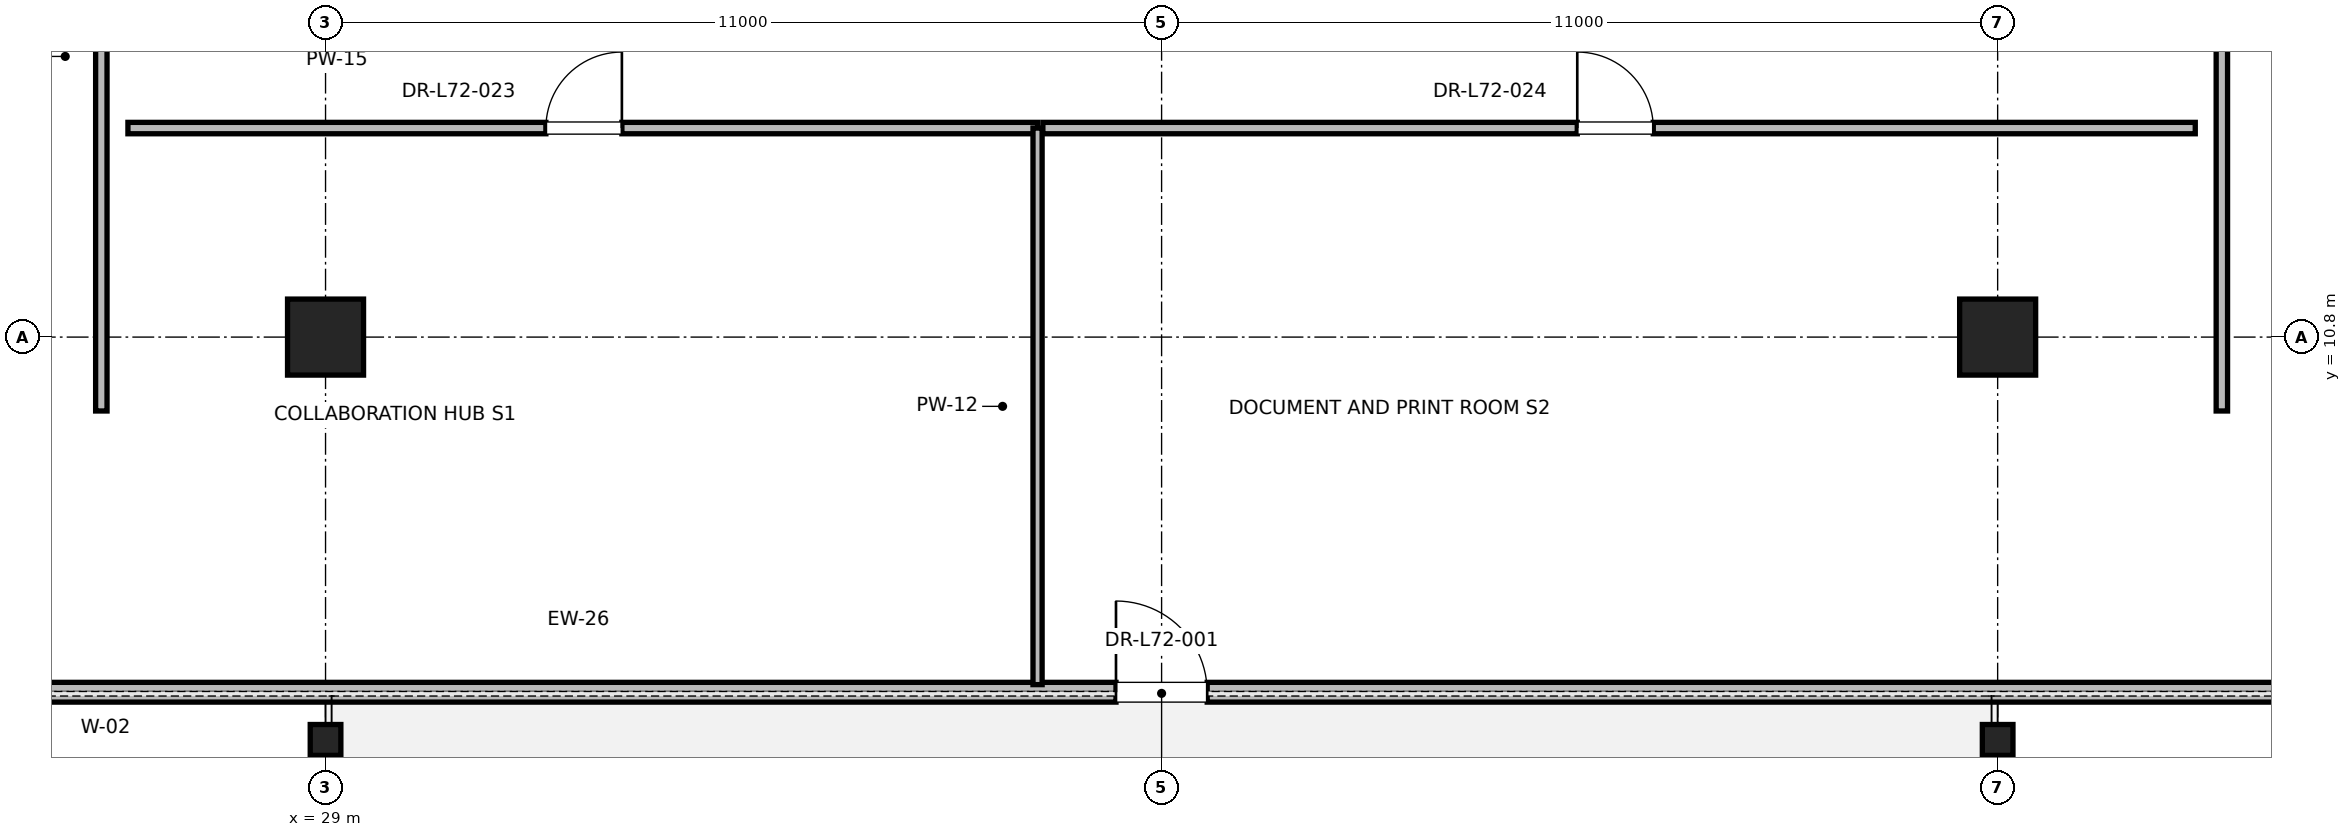
"""IFC4 building model, lengths in metres.
Left out: names, types, materials, properties, quantities, classifications, styles, units other than length and angle.
Written with IfcOpenShell. Run it as: python <this file> out.ifc"""

import sys

from ifc_helpers import new_model, si_unit, direction, frame, frame_2d, origin, origin_2d, place, context, subcontext, project, spatial, rectangle, i_section, extrude, element, fill, save


model = new_model("IFC4")
c1 = context("Model", 3, precision=1e-05, world=origin(), true_north=direction((0.0, 1.0)))
c2 = subcontext(c1, "Body", "Model", "MODEL_VIEW")
j1 = project(units=[si_unit("LENGTHUNIT", "METRE"), si_unit("PLANEANGLEUNIT", "RADIAN")], contexts=[c1])
p1 = place(None, origin())
s1 = spatial("IfcSite", under=j1, at=p1, CompositionType="ELEMENT")
p2 = place(p1, origin())
s2 = spatial("IfcBuilding", under=s1, at=p2, CompositionType="ELEMENT")
p3 = place(p2, frame((0.0, 0.0, 310.8)))
s3 = spatial("IfcBuildingStorey", under=s2, at=p3, CompositionType="ELEMENT", Elevation=310.8)
for number, where, z_axis, x_axis in (
    (1, (29.0, 10.8, 0.0), (0.0, 0.0, 1.0), (1.0, 0.0, 0.0)),
    (2, (51.0, 10.8, 0.0), (0.0, 0.0, 1.0), (1.0, 0.0, 0.0)),
):
    element("IfcColumn", number, at=place(p3, frame(where, z_axis=z_axis, x_axis=x_axis)), inside=s3, PredefinedType="COLUMN", context=c2, shape_type="SweptSolid", body=[
        extrude(rectangle(XDim=1.0, YDim=1.0, at=origin_2d()), origin(), (0.0, 0.0, 1.0), 4.0),
    ])
for number, where, z_axis, x_axis in (
    (3, (29.0, 5.5, 0.0), (0.0, 0.0, 1.0), (1.0, 0.0, 0.0)),
    (4, (51.0, 5.5, 0.0), (0.0, 0.0, 1.0), (1.0, 0.0, 0.0)),
):
    element("IfcColumn", number, at=place(p3, frame(where, z_axis=z_axis, x_axis=x_axis)), inside=s3, PredefinedType="COLUMN", context=c2, shape_type="SweptSolid", body=[
        extrude(i_section(OverallWidth=0.403, OverallDepth=0.406, WebThickness=0.027, FlangeThickness=0.043, FilletRadius=0.015, at=origin_2d()), origin(), (0.0, 0.0, 1.0), 4.0),
    ])
p4 = place(p3, frame((19.456, 6.128, 0.0), z_axis=(0.0, 0.0, 1.0), x_axis=(1.0, 0.0, 0.0)))
e5 = element("IfcWall", 5, at=p4, inside=s3, PredefinedType="PARAPET", context=c2, shape_type="SweptSolid", body=[
    extrude(rectangle(XDim=41.089, YDim=0.26, at=frame_2d((20.544, 0.0))), origin(), (0.0, 0.0, 1.0), 3.196),
])
p5 = place(p4, frame((4.2, 0.0, 0.85)))
e6 = element("IfcOpeningElement", 6, at=p5, cuts=e5, PredefinedType="OPENING", context=c2, shape_type="SweptSolid", body=[
    extrude(rectangle(XDim=1.6, YDim=2.1, at=frame_2d((0.8, 1.05))), frame((0.0, 0.13, 0.0), z_axis=(0.0, -1.0, 0.0), x_axis=(1.0, 0.0, 0.0)), (0.0, 0.0, 1.0), 0.26),
])
p6 = place(p4, frame((19.944, 0.0, 0.0)))
e7 = element("IfcOpeningElement", 7, at=p6, cuts=e5, PredefinedType="OPENING", context=c2, shape_type="SweptSolid", body=[
    extrude(rectangle(XDim=1.2, YDim=2.2, at=frame_2d((0.6, 1.1))), frame((0.0, 0.13, 0.0), z_axis=(0.0, -1.0, 0.0), x_axis=(1.0, 0.0, 0.0)), (0.0, 0.0, 1.0), 0.26),
])
p7 = place(p4, frame((35.289, 0.0, 0.85)))
e8 = element("IfcOpeningElement", 8, at=p7, cuts=e5, PredefinedType="OPENING", context=c2, shape_type="SweptSolid", body=[
    extrude(rectangle(XDim=1.6, YDim=2.1, at=frame_2d((0.8, 1.05))), frame((0.0, 0.13, 0.0), z_axis=(0.0, -1.0, 0.0), x_axis=(1.0, 0.0, 0.0)), (0.0, 0.0, 1.0), 0.26),
])
p8 = place(p3, frame((26.4, 13.55, 0.0), z_axis=(0.0, 0.0, 1.0), x_axis=(1.0, 0.0, 0.0)))
e9 = element("IfcWall", 9, at=p8, inside=s3, PredefinedType="PARTITIONING", context=c2, shape_type="SweptSolid", body=[
    extrude(rectangle(XDim=11.968, YDim=0.15, at=frame_2d((5.984, 0.0))), origin(), (0.0, 0.0, 1.0), 2.85),
])
p9 = place(p8, frame((5.499, 0.0, 0.0)))
e10 = element("IfcOpeningElement", 10, at=p9, cuts=e9, PredefinedType="OPENING", context=c2, shape_type="SweptSolid", body=[
    extrude(rectangle(XDim=1.0, YDim=2.15, at=frame_2d((0.5, 1.075))), frame((0.0, 0.075, 0.0), z_axis=(0.0, -1.0, 0.0), x_axis=(1.0, 0.0, 0.0)), (0.0, 0.0, 1.0), 0.15),
])
p10 = place(p3, frame((38.368, 6.228, 0.0), z_axis=(0.0, 0.0, 1.0), x_axis=(0.0, 1.0, 0.0)))
e11 = element("IfcWall", 11, at=p10, inside=s3, PredefinedType="PARTITIONING", context=c2, shape_type="SweptSolid", body=[
    extrude(rectangle(XDim=7.322, YDim=0.12, at=frame_2d((3.661, 0.0))), origin(), (0.0, 0.0, 1.0), 2.415),
])
p11 = place(p3, frame((38.438, 13.55, 0.0), z_axis=(0.0, 0.0, 1.0), x_axis=(1.0, 0.0, 0.0)))
e12 = element("IfcWall", 12, at=p11, inside=s3, PredefinedType="PARTITIONING", context=c2, shape_type="SweptSolid", body=[
    extrude(rectangle(XDim=15.162, YDim=0.15, at=frame_2d((7.581, 0.0))), origin(), (0.0, 0.0, 1.0), 2.85),
])
p12 = place(p11, frame((7.031, 0.0, 0.0)))
e13 = element("IfcOpeningElement", 13, at=p12, cuts=e12, PredefinedType="OPENING", context=c2, shape_type="SweptSolid", body=[
    extrude(rectangle(XDim=1.0, YDim=2.15, at=frame_2d((0.5, 1.075))), frame((0.0, 0.075, 0.0), z_axis=(0.0, -1.0, 0.0), x_axis=(1.0, 0.0, 0.0)), (0.0, 0.0, 1.0), 0.15),
])
p13 = place(p3, frame((26.05, 9.828, 0.0), z_axis=(0.0, 0.0, 1.0), x_axis=(0.0, 1.0, 0.0)))
e14 = element("IfcWall", 14, at=p13, inside=s3, PredefinedType="PARTITIONING", context=c2, shape_type="SweptSolid", body=[
    extrude(rectangle(XDim=10.957, YDim=0.15, at=frame_2d((5.479, 0.0))), origin(), (0.0, 0.0, 1.0), 2.85),
])
p14 = place(p13, frame((9.33, 0.0, 0.0)))
e15 = element("IfcOpeningElement", 15, at=p14, cuts=e14, PredefinedType="OPENING", context=c2, shape_type="SweptSolid", body=[
    extrude(rectangle(XDim=1.0, YDim=2.15, at=frame_2d((0.5, 1.075))), frame((0.0, 0.075, 0.0), z_axis=(0.0, -1.0, 0.0), x_axis=(1.0, 0.0, 0.0)), (0.0, 0.0, 1.0), 0.15),
])
p15 = place(p3, frame((53.95, 9.828, 0.0), z_axis=(0.0, 0.0, 1.0), x_axis=(0.0, 1.0, 0.0)))
e16 = element("IfcWall", 16, at=p15, inside=s3, PredefinedType="PARTITIONING", context=c2, shape_type="SweptSolid", body=[
    extrude(rectangle(XDim=12.724, YDim=0.15, at=frame_2d((6.362, 0.0))), origin(), (0.0, 0.0, 1.0), 2.85),
])
p16 = place(p15, frame((10.213, 0.0, 0.0)))
e17 = element("IfcOpeningElement", 17, at=p16, cuts=e16, PredefinedType="OPENING", context=c2, shape_type="SweptSolid", body=[
    extrude(rectangle(XDim=1.0, YDim=2.15, at=frame_2d((0.5, 1.075))), frame((0.0, 0.075, 0.0), z_axis=(0.0, -1.0, 0.0), x_axis=(1.0, 0.0, 0.0)), (0.0, 0.0, 1.0), 0.15),
])
p17 = place(p6, origin())
e18 = element("IfcDoor", 18, at=p17, inside=s3, OperationType="SINGLE_SWING_LEFT", PredefinedType="DOOR", context=c2, shape_type="SweptSolid", body=[
    extrude(rectangle(XDim=1.2, YDim=2.2, at=frame_2d((0.6, 1.1))), frame((0.0, 0.025, 0.0), z_axis=(0.0, -1.0, 0.0), x_axis=(1.0, 0.0, 0.0)), (0.0, 0.0, 1.0), 0.05),
])
fill(e7, e18)
p18 = place(p9, origin())
e19 = element("IfcDoor", 19, at=p18, inside=s3, OperationType="SINGLE_SWING_RIGHT", PredefinedType="DOOR", context=c2, shape_type="SweptSolid", body=[
    extrude(rectangle(XDim=1.0, YDim=2.15, at=frame_2d((0.5, 1.075))), frame((0.0, 0.025, 0.0), z_axis=(0.0, -1.0, 0.0), x_axis=(1.0, 0.0, 0.0)), (0.0, 0.0, 1.0), 0.05),
])
fill(e10, e19)
p19 = place(p12, origin())
e20 = element("IfcDoor", 20, at=p19, inside=s3, OperationType="SINGLE_SWING_LEFT", PredefinedType="DOOR", context=c2, shape_type="SweptSolid", body=[
    extrude(rectangle(XDim=1.0, YDim=2.15, at=frame_2d((0.5, 1.075))), frame((0.0, 0.025, 0.0), z_axis=(0.0, -1.0, 0.0), x_axis=(1.0, 0.0, 0.0)), (0.0, 0.0, 1.0), 0.05),
])
fill(e13, e20)
save(model, sys.argv[1])
